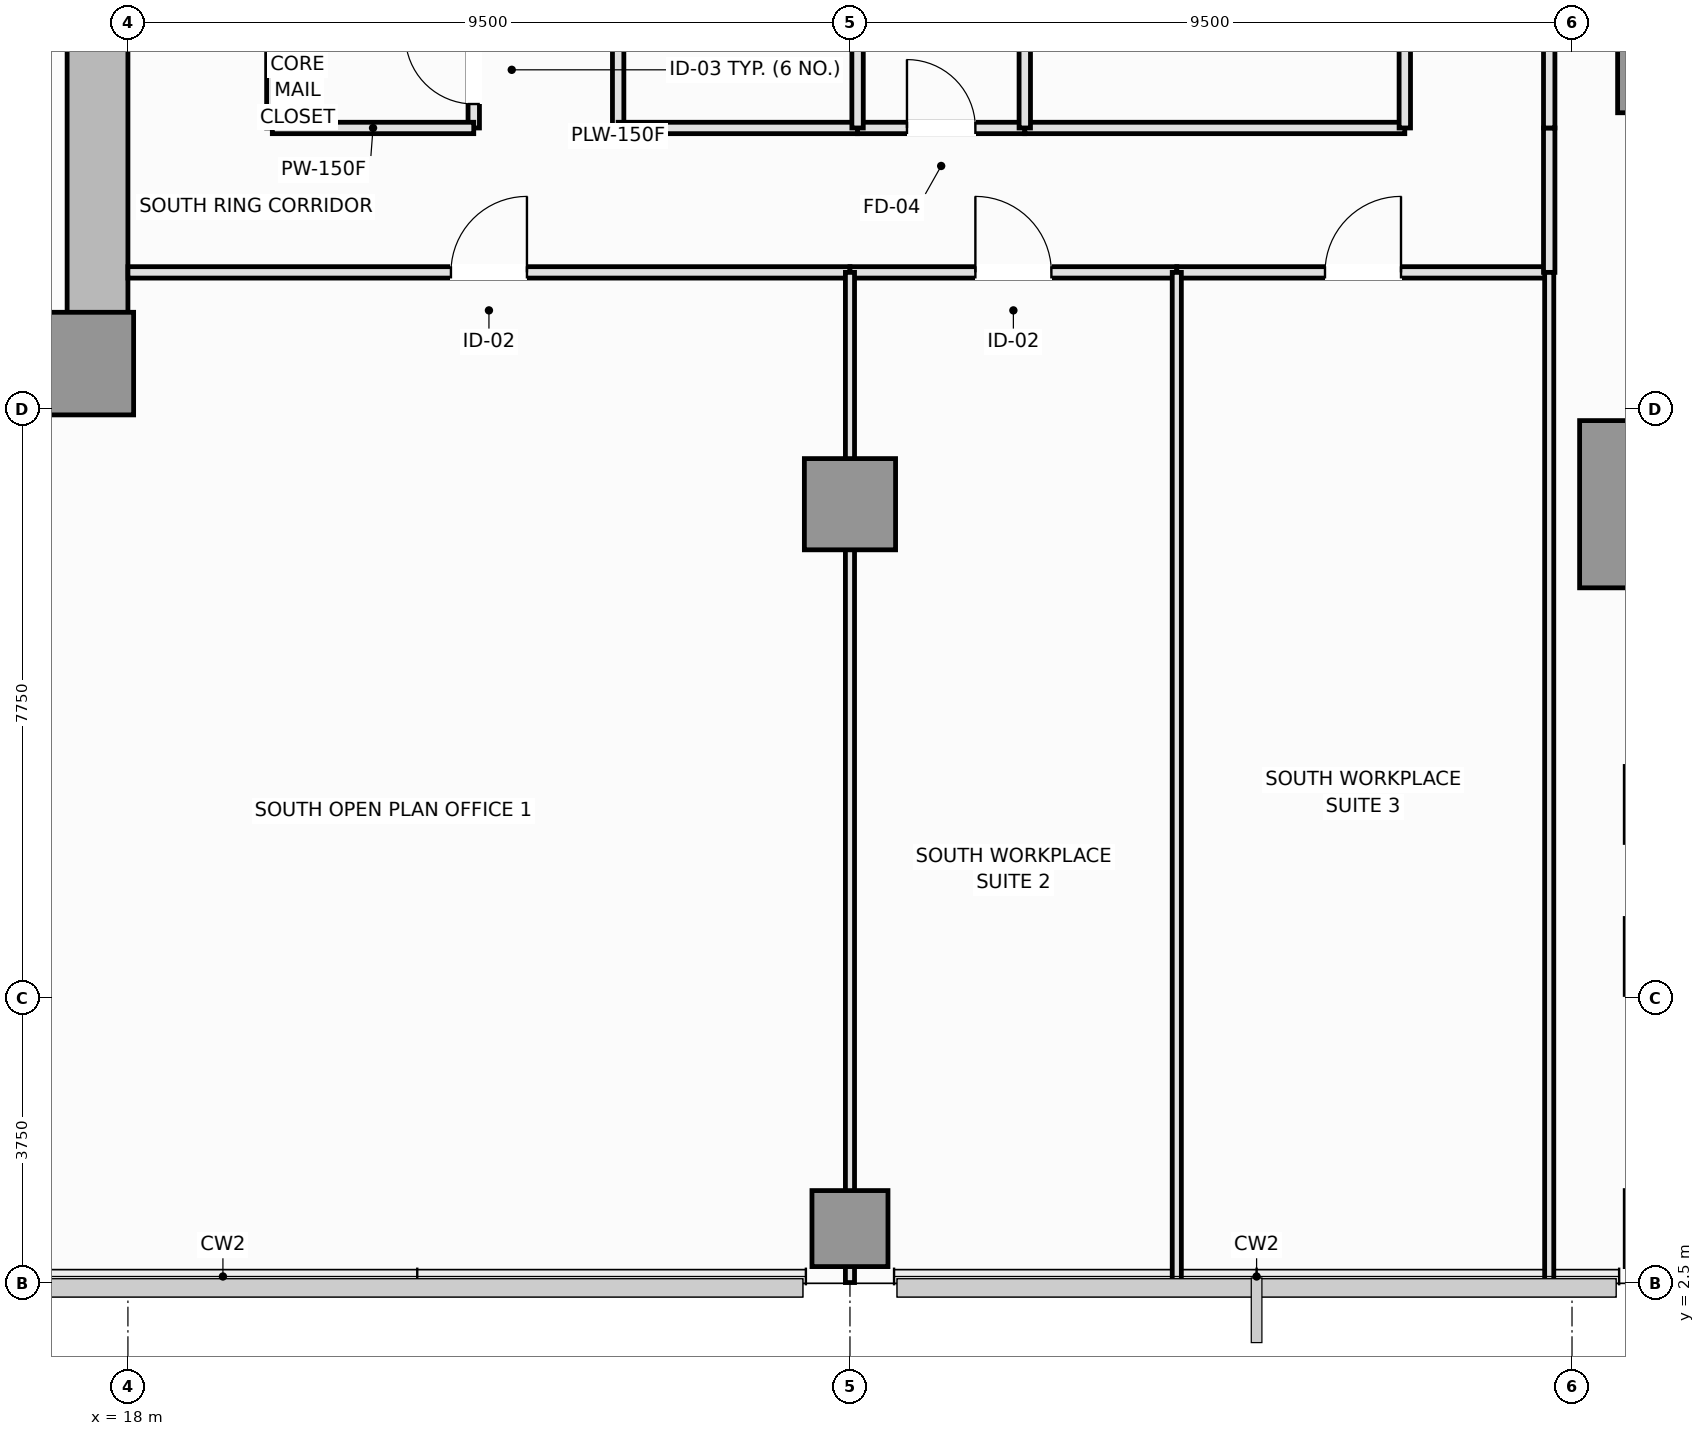
"""IFC4 building model, lengths in metres.
Left out: names, types, materials, properties, quantities, classifications, styles, units other than length and angle.
Written with IfcOpenShell. Run it as: python <this file> out.ifc"""

import sys

from ifc_helpers import new_model, si_unit, direction, frame, frame_2d, origin, origin_2d, place, context, subcontext, project, spatial, rectangle, extrude, element, fill, save


model = new_model("IFC4")
c1 = context("Model", 3, precision=1e-05, world=origin(), true_north=direction((0.0, 1.0)))
c2 = subcontext(c1, "Body", "Model", "MODEL_VIEW")
j1 = project(units=[si_unit("LENGTHUNIT", "METRE"), si_unit("PLANEANGLEUNIT", "RADIAN")], contexts=[c1])
p1 = place(None, origin())
s1 = spatial("IfcSite", under=j1, at=p1, CompositionType="ELEMENT")
p2 = place(p1, origin())
s2 = spatial("IfcBuilding", under=s1, at=p2, CompositionType="ELEMENT")
p3 = place(p2, frame((0.0, 0.0, 68.2)))
s3 = spatial("IfcBuildingStorey", under=s2, at=p3, CompositionType="ELEMENT", Elevation=68.2)
p4 = place(p3, frame((4.5, 14.4, 0.0), z_axis=(0.0, 0.0, 1.0), x_axis=(1.0, 0.0, 0.0)))
e1 = element("IfcWall", 1, at=p4, inside=s3, PredefinedType="SHEAR", context=c2, shape_type="SweptSolid", body=[
    extrude(rectangle(XDim=13.5, YDim=0.8, at=frame_2d((6.75, 0.0))), origin(), (0.0, 0.0, 1.0), 3.55),
])
p5 = place(p3, frame((17.6, 14.8, 0.0), z_axis=(0.0, 0.0, 1.0), x_axis=(0.0, 1.0, 0.0)))
e2 = element("IfcWall", 2, at=p5, inside=s3, PredefinedType="SHEAR", context=c2, shape_type="SweptSolid", body=[
    extrude(rectangle(XDim=8.65, YDim=0.8, at=frame_2d((4.325, 0.0))), origin(), (0.0, 0.0, 1.0), 3.55),
])
p6 = place(p5, frame((4.1, 0.0, 0.0)))
e3 = element("IfcOpeningElement", 3, at=p6, cuts=e2, PredefinedType="OPENING", context=c2, shape_type="SweptSolid", body=[
    extrude(rectangle(XDim=1.1, YDim=2.15, at=frame_2d((0.55, 1.075))), frame((0.0, 0.41, 0.0), z_axis=(0.0, -1.0, 0.0), x_axis=(1.0, 0.0, 0.0)), (0.0, 0.0, 1.0), 0.82),
])
p7 = place(p3, frame((17.4, 14.6, 0.0), z_axis=(0.0, 0.0, 1.0), x_axis=(1.0, 0.0, 0.0)))
e4 = element("IfcColumn", 4, at=p7, inside=s3, PredefinedType="PILASTER", context=c2, shape_type="SweptSolid", body=[
    extrude(rectangle(XDim=1.35, YDim=1.35, at=origin_2d()), origin(), (0.0, 0.0, 1.0), 3.55),
])
p8 = place(p3, frame((38.2, 12.75, 0.0), z_axis=(0.0, 0.0, 1.0), x_axis=(1.0, 0.0, 0.0)))
e5 = element("IfcColumn", 5, at=p8, inside=s3, PredefinedType="COLUMN", context=c2, shape_type="SweptSolid", body=[
    extrude(rectangle(XDim=2.2, YDim=2.2, at=origin_2d()), origin(), (0.0, 0.0, 1.0), 3.55),
])
for number, where, z_axis, x_axis in (
    (6, (27.5, 12.75, 0.0), (0.0, 0.0, 1.0), (1.0, 0.0, 0.0)),
    (7, (38.2, 18.5, 0.0), (0.0, 0.0, 1.0), (1.0, 0.0, 0.0)),
):
    element("IfcColumn", number, at=place(p3, frame(where, z_axis=z_axis, x_axis=x_axis)), inside=s3, PredefinedType="COLUMN", context=c2, shape_type="SweptSolid", body=[
        extrude(rectangle(XDim=1.2, YDim=1.2, at=origin_2d()), origin(), (0.0, 0.0, 1.0), 3.55),
    ])
p9 = place(p3, frame((27.5, 3.22, 0.0), z_axis=(0.0, 0.0, 1.0), x_axis=(1.0, 0.0, 0.0)))
e8 = element("IfcColumn", 8, at=p9, inside=s3, PredefinedType="COLUMN", context=c2, shape_type="SweptSolid", body=[
    extrude(rectangle(XDim=1.0, YDim=1.0, at=origin_2d()), origin(), (0.0, 0.0, 1.0), 3.55),
])
p10 = place(p3, frame((22.55, 17.7, 0.0), z_axis=(0.0, 0.0, 1.0), x_axis=(0.0, 1.0, 0.0)))
e9 = element("IfcWall", 9, at=p10, inside=s3, PredefinedType="PARTITIONING", context=c2, shape_type="SweptSolid", body=[
    extrude(rectangle(XDim=1.53, YDim=0.15, at=frame_2d((0.765, 0.0))), origin(), (0.0, 0.0, 1.0), 3.01),
])
p11 = place(p10, frame((0.315, 0.0, 0.0)))
e10 = element("IfcOpeningElement", 10, at=p11, cuts=e9, PredefinedType="OPENING", context=c2, shape_type="SweptSolid", body=[
    extrude(rectangle(XDim=0.9, YDim=2.1, at=frame_2d((0.45, 1.05))), frame((0.0, 0.085, 0.0), z_axis=(0.0, -1.0, 0.0), x_axis=(1.0, 0.0, 0.0)), (0.0, 0.0, 1.0), 0.17),
])
p12 = place(p3, frame((24.45, 17.7, 0.0), z_axis=(0.0, 0.0, 1.0), x_axis=(0.0, 1.0, 0.0)))
e11 = element("IfcWall", 11, at=p12, inside=s3, PredefinedType="PLUMBINGWALL", context=c2, shape_type="SweptSolid", body=[
    extrude(rectangle(XDim=3.1, YDim=0.15, at=frame_2d((1.55, 0.0))), origin(), (0.0, 0.0, 1.0), 3.37),
])
p13 = place(p12, frame((1.1, 0.0, 0.0)))
e12 = element("IfcOpeningElement", 12, at=p13, cuts=e11, PredefinedType="OPENING", context=c2, shape_type="SweptSolid", body=[
    extrude(rectangle(XDim=0.9, YDim=2.1, at=frame_2d((0.45, 1.05))), frame((0.0, 0.085, 0.0), z_axis=(0.0, -1.0, 0.0), x_axis=(1.0, 0.0, 0.0)), (0.0, 0.0, 1.0), 0.17),
])
p14 = place(p3, frame((19.9, 17.7, 0.0), z_axis=(0.0, 0.0, 1.0), x_axis=(0.0, 1.0, 0.0)))
e13 = element("IfcWall", 13, at=p14, inside=s3, PredefinedType="PARTITIONING", context=c2, shape_type="SweptSolid", body=[
    extrude(rectangle(XDim=1.53, YDim=0.15, at=frame_2d((0.765, 0.0))), origin(), (0.0, 0.0, 1.0), 3.37),
])
p15 = place(p3, frame((19.9, 17.7, 0.0), z_axis=(0.0, 0.0, 1.0), x_axis=(1.0, 0.0, 0.0)))
e14 = element("IfcWall", 14, at=p15, inside=s3, PredefinedType="PARTITIONING", context=c2, shape_type="SweptSolid", body=[
    extrude(rectangle(XDim=2.65, YDim=0.15, at=frame_2d((1.325, 0.0))), origin(), (0.0, 0.0, 1.0), 3.37),
])
p16 = place(p3, frame((24.45, 17.7, 0.0), z_axis=(0.0, 0.0, 1.0), x_axis=(1.0, 0.0, 0.0)))
e15 = element("IfcWall", 15, at=p16, inside=s3, PredefinedType="PLUMBINGWALL", context=c2, shape_type="SweptSolid", body=[
    extrude(rectangle(XDim=3.15, YDim=0.15, at=frame_2d((1.575, 0.0))), origin(), (0.0, 0.0, 1.0), 3.37),
])
p17 = place(p3, frame((27.6, 17.7, 0.0), z_axis=(0.0, 0.0, 1.0), x_axis=(1.0, 0.0, 0.0)))
e16 = element("IfcWall", 16, at=p17, inside=s3, PredefinedType="PLUMBINGWALL", context=c2, shape_type="SweptSolid", body=[
    extrude(rectangle(XDim=2.2, YDim=0.15, at=frame_2d((1.1, 0.0))), origin(), (0.0, 0.0, 1.0), 3.37),
])
p18 = place(p17, frame((0.65, 0.0, 0.0)))
e17 = element("IfcOpeningElement", 17, at=p18, cuts=e16, PredefinedType="OPENING", context=c2, shape_type="SweptSolid", body=[
    extrude(rectangle(XDim=0.9, YDim=2.1, at=frame_2d((0.45, 1.05))), frame((0.0, 0.085, 0.0), z_axis=(0.0, -1.0, 0.0), x_axis=(1.0, 0.0, 0.0)), (0.0, 0.0, 1.0), 0.17),
])
p19 = place(p3, frame((29.8, 17.7, 0.0), z_axis=(0.0, 0.0, 1.0), x_axis=(1.0, 0.0, 0.0)))
e18 = element("IfcWall", 18, at=p19, inside=s3, PredefinedType="PARTITIONING", context=c2, shape_type="SweptSolid", body=[
    extrude(rectangle(XDim=5.0, YDim=0.15, at=frame_2d((2.5, 0.0))), origin(), (0.0, 0.0, 1.0), 3.37),
])
p20 = place(p3, frame((18.0, 15.8, 0.0), z_axis=(0.0, 0.0, 1.0), x_axis=(1.0, 0.0, 0.0)))
e19 = element("IfcWall", 19, at=p20, inside=s3, PredefinedType="PARTITIONING", context=c2, shape_type="SweptSolid", body=[
    extrude(rectangle(XDim=9.5, YDim=0.15, at=frame_2d((4.75, 0.0))), origin(), (0.0, 0.0, 1.0), 3.37),
])
p21 = place(p20, frame((4.25, 0.0, 0.0)))
e20 = element("IfcOpeningElement", 20, at=p21, cuts=e19, PredefinedType="OPENING", context=c2, shape_type="SweptSolid", body=[
    extrude(rectangle(XDim=1.0, YDim=2.15, at=frame_2d((0.5, 1.075))), frame((0.0, 0.085, 0.0), z_axis=(0.0, -1.0, 0.0), x_axis=(1.0, 0.0, 0.0)), (0.0, 0.0, 1.0), 0.17),
])
p22 = place(p3, frame((27.5, 15.8, 0.0), z_axis=(0.0, 0.0, 1.0), x_axis=(1.0, 0.0, 0.0)))
e21 = element("IfcWall", 21, at=p22, inside=s3, PredefinedType="PARTITIONING", context=c2, shape_type="SweptSolid", body=[
    extrude(rectangle(XDim=4.3, YDim=0.15, at=frame_2d((2.15, 0.0))), origin(), (0.0, 0.0, 1.0), 3.37),
])
p23 = place(p22, frame((1.65, 0.0, 0.0)))
e22 = element("IfcOpeningElement", 22, at=p23, cuts=e21, PredefinedType="OPENING", context=c2, shape_type="SweptSolid", body=[
    extrude(rectangle(XDim=1.0, YDim=2.15, at=frame_2d((0.5, 1.075))), frame((0.0, 0.085, 0.0), z_axis=(0.0, -1.0, 0.0), x_axis=(1.0, 0.0, 0.0)), (0.0, 0.0, 1.0), 0.17),
])
p24 = place(p3, frame((31.8, 15.8, 0.0), z_axis=(0.0, 0.0, 1.0), x_axis=(1.0, 0.0, 0.0)))
e23 = element("IfcWall", 23, at=p24, inside=s3, PredefinedType="PARTITIONING", context=c2, shape_type="SweptSolid", body=[
    extrude(rectangle(XDim=4.9, YDim=0.15, at=frame_2d((2.45, 0.0))), origin(), (0.0, 0.0, 1.0), 3.37),
])
p25 = place(p24, frame((1.95, 0.0, 0.0)))
e24 = element("IfcOpeningElement", 24, at=p25, cuts=e23, PredefinedType="OPENING", context=c2, shape_type="SweptSolid", body=[
    extrude(rectangle(XDim=1.0, YDim=2.15, at=frame_2d((0.5, 1.075))), frame((0.0, 0.085, 0.0), z_axis=(0.0, -1.0, 0.0), x_axis=(1.0, 0.0, 0.0)), (0.0, 0.0, 1.0), 0.17),
])
p26 = place(p3, frame((36.7, 15.8, 0.0), z_axis=(0.0, 0.0, 1.0), x_axis=(0.0, 1.0, 0.0)))
e25 = element("IfcWall", 25, at=p26, inside=s3, PredefinedType="PARTITIONING", context=c2, shape_type="SweptSolid", body=[
    extrude(rectangle(XDim=1.9, YDim=0.15, at=frame_2d((0.95, 0.0))), origin(), (0.0, 0.0, 1.0), 3.37),
])
p27 = place(p3, frame((34.8, 17.7, 0.0), z_axis=(0.0, 0.0, 1.0), x_axis=(0.0, 1.0, 0.0)))
e26 = element("IfcWall", 26, at=p27, inside=s3, PredefinedType="PARTITIONING", context=c2, shape_type="SweptSolid", body=[
    extrude(rectangle(XDim=3.1, YDim=0.15, at=frame_2d((1.55, 0.0))), origin(), (0.0, 0.0, 1.0), 3.37),
])
p28 = place(p27, frame((1.05, 0.0, 0.0)))
e27 = element("IfcOpeningElement", 27, at=p28, cuts=e26, PredefinedType="OPENING", context=c2, shape_type="SweptSolid", body=[
    extrude(rectangle(XDim=1.0, YDim=2.15, at=frame_2d((0.5, 1.075))), frame((0.0, 0.085, 0.0), z_axis=(0.0, -1.0, 0.0), x_axis=(1.0, 0.0, 0.0)), (0.0, 0.0, 1.0), 0.17),
])
p29 = place(p3, frame((36.7, 17.7, 0.0), z_axis=(0.0, 0.0, 1.0), x_axis=(0.0, 1.0, 0.0)))
e28 = element("IfcWall", 28, at=p29, inside=s3, PredefinedType="PARTITIONING", context=c2, shape_type="SweptSolid", body=[
    extrude(rectangle(XDim=14.3, YDim=0.15, at=frame_2d((7.15, 0.0))), origin(), (0.0, 0.0, 1.0), 3.37),
])
p30 = place(p29, frame((5.683, 0.0, 0.0)))
e29 = element("IfcOpeningElement", 29, at=p30, cuts=e28, PredefinedType="OPENING", context=c2, shape_type="SweptSolid", body=[
    extrude(rectangle(XDim=1.0, YDim=2.15, at=frame_2d((0.5, 1.075))), frame((0.0, 0.085, 0.0), z_axis=(0.0, -1.0, 0.0), x_axis=(1.0, 0.0, 0.0)), (0.0, 0.0, 1.0), 0.17),
])
for number, where, z_axis, x_axis in (
    (30, (27.6, 17.7, 0.0), (0.0, 0.0, 1.0), (0.0, 1.0, 0.0)),
    (31, (29.8, 17.7, 0.0), (0.0, 0.0, 1.0), (0.0, 1.0, 0.0)),
):
    element("IfcWall", number, at=place(p3, frame(where, z_axis=z_axis, x_axis=x_axis)), inside=s3, PredefinedType="PLUMBINGWALL", context=c2, shape_type="SweptSolid", body=[
        extrude(rectangle(XDim=3.1, YDim=0.15, at=frame_2d((1.55, 0.0))), origin(), (0.0, 0.0, 1.0), 3.37),
    ])
p31 = place(p3, frame((27.5, 2.51, 0.0), z_axis=(0.0, 0.0, 1.0), x_axis=(0.0, 1.0, 0.0)))
e32 = element("IfcWall", 32, at=p31, inside=s3, PredefinedType="PARTITIONING", context=c2, shape_type="SweptSolid", body=[
    extrude(rectangle(XDim=13.29, YDim=0.12, at=frame_2d((6.645, 0.0))), origin(), (0.0, 0.0, 1.0), 2.82),
])
for number, where, z_axis, x_axis in (
    (33, (31.8, 2.51, 0.0), (0.0, 0.0, 1.0), (0.0, 1.0, 0.0)),
    (34, (36.7, 2.51, 0.0), (0.0, 0.0, 1.0), (0.0, 1.0, 0.0)),
):
    element("IfcWall", number, at=place(p3, frame(where, z_axis=z_axis, x_axis=x_axis)), inside=s3, PredefinedType="PARTITIONING", context=c2, shape_type="SweptSolid", body=[
        extrude(rectangle(XDim=13.29, YDim=0.12, at=frame_2d((6.645, 0.0))), origin(), (0.0, 0.0, 1.0), 3.37),
    ])
p32 = place(p11, origin())
e35 = element("IfcDoor", 35, at=p32, inside=s3, OperationType="SINGLE_SWING_RIGHT", PredefinedType="DOOR", context=c2, shape_type="SweptSolid", body=[
    extrude(rectangle(XDim=0.9, YDim=2.1, at=frame_2d((0.45, 1.05))), frame((0.0, 0.025, 0.0), z_axis=(0.0, -1.0, 0.0), x_axis=(1.0, 0.0, 0.0)), (0.0, 0.0, 1.0), 0.05),
])
fill(e10, e35)
p33 = place(p18, origin())
e36 = element("IfcDoor", 36, at=p33, inside=s3, OperationType="SINGLE_SWING_LEFT", PredefinedType="DOOR", context=c2, shape_type="SweptSolid", body=[
    extrude(rectangle(XDim=0.9, YDim=2.1, at=frame_2d((0.45, 1.05))), frame((0.0, 0.025, 0.0), z_axis=(0.0, -1.0, 0.0), x_axis=(1.0, 0.0, 0.0)), (0.0, 0.0, 1.0), 0.05),
])
fill(e17, e36)
p34 = place(p21, origin())
e37 = element("IfcDoor", 37, at=p34, inside=s3, OperationType="SINGLE_SWING_RIGHT", PredefinedType="DOOR", context=c2, shape_type="SweptSolid", body=[
    extrude(rectangle(XDim=1.0, YDim=2.15, at=frame_2d((0.5, 1.075))), frame((0.0, 0.025, 0.0), z_axis=(0.0, -1.0, 0.0), x_axis=(1.0, 0.0, 0.0)), (0.0, 0.0, 1.0), 0.05),
])
fill(e20, e37)
p35 = place(p23, origin())
e38 = element("IfcDoor", 38, at=p35, inside=s3, OperationType="SINGLE_SWING_LEFT", PredefinedType="DOOR", context=c2, shape_type="SweptSolid", body=[
    extrude(rectangle(XDim=1.0, YDim=2.15, at=frame_2d((0.5, 1.075))), frame((0.0, 0.025, 0.0), z_axis=(0.0, -1.0, 0.0), x_axis=(1.0, 0.0, 0.0)), (0.0, 0.0, 1.0), 0.05),
])
fill(e22, e38)
p36 = place(p25, origin())
e39 = element("IfcDoor", 39, at=p36, inside=s3, OperationType="SINGLE_SWING_RIGHT", PredefinedType="DOOR", context=c2, shape_type="SweptSolid", body=[
    extrude(rectangle(XDim=1.0, YDim=2.15, at=frame_2d((0.5, 1.075))), frame((0.0, 0.025, 0.0), z_axis=(0.0, -1.0, 0.0), x_axis=(1.0, 0.0, 0.0)), (0.0, 0.0, 1.0), 0.05),
])
fill(e24, e39)
save(model, sys.argv[1])
